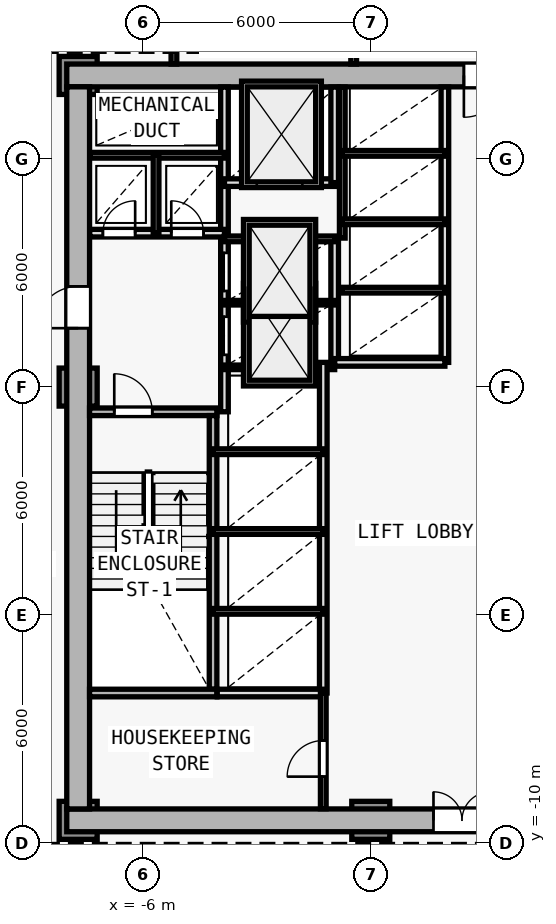
"""IFC4 building model, lengths in metres.
Left out: names, types, materials, properties, quantities, classifications, styles, units other than length and angle.
Written with IfcOpenShell. Run it as: python <this file> out.ifc"""

import sys

from ifc_helpers import new_model, si_unit, direction, frame, frame_2d, origin, origin_2d, place, context, subcontext, project, spatial, rectangle, extrude, element, fill, save


model = new_model("IFC4")
c1 = context("Model", 3, precision=1e-05, world=origin(), true_north=direction((0.0, 1.0)))
c2 = subcontext(c1, "Body", "Model", "MODEL_VIEW")
j1 = project(units=[si_unit("LENGTHUNIT", "METRE"), si_unit("PLANEANGLEUNIT", "RADIAN")], contexts=[c1])
p1 = place(None, origin())
s1 = spatial("IfcSite", under=j1, at=p1, CompositionType="ELEMENT")
p2 = place(p1, origin())
s2 = spatial("IfcBuilding", under=s1, at=p2, CompositionType="ELEMENT")
p3 = place(p2, frame((0.0, 0.0, 13.4)))
s3 = spatial("IfcBuildingStorey", under=s2, at=p3, CompositionType="ELEMENT", Elevation=13.4)
for number, where, z_axis, x_axis in (
    (1, (-7.7, -9.4, 0.0), (0.0, 0.0, 1.0), (1.0, 0.0, 0.0)),
    (2, (-7.7, 10.2, 0.0), (0.0, 0.0, 1.0), (1.0, 0.0, 0.0)),
    (3, (0.0, -9.4, 0.0), (0.0, 0.0, 1.0), (1.0, 0.0, 0.0)),
    (4, (-7.7, 2.0, 0.0), (0.0, 0.0, 1.0), (1.0, 0.0, 0.0)),
):
    element("IfcColumn", number, at=place(p3, frame(where, z_axis=z_axis, x_axis=x_axis)), inside=s3, PredefinedType="COLUMN", context=c2, shape_type="SweptSolid", body=[
        extrude(rectangle(XDim=1.0, YDim=1.0, at=origin_2d()), origin(), (0.0, 0.0, 1.0), 4.2),
    ])
p4 = place(p3, frame((-8.0, -9.4, 0.0), z_axis=(0.0, 0.0, 1.0), x_axis=(1.0, 0.0, 0.0)))
e5 = element("IfcWall", 5, at=p4, inside=s3, PredefinedType="SHEAR", context=c2, shape_type="SweptSolid", body=[
    extrude(rectangle(XDim=16.0, YDim=0.6, at=frame_2d((8.0, 0.0))), origin(), (0.0, 0.0, 1.0), 3.92),
])
p5 = place(p4, frame((9.65, 0.0, 0.0)))
e6 = element("IfcOpeningElement", 6, at=p5, cuts=e5, PredefinedType="OPENING", context=c2, shape_type="SweptSolid", body=[
    extrude(rectangle(XDim=1.5, YDim=2.2, at=frame_2d((0.75, 1.1))), frame((0.0, 0.31, 0.0), z_axis=(0.0, -1.0, 0.0), x_axis=(1.0, 0.0, 0.0)), (0.0, 0.0, 1.0), 0.62),
])
p6 = place(p3, frame((8.0, 10.2, 0.0), z_axis=(0.0, 0.0, 1.0), x_axis=(-1.0, 0.0, 0.0)))
e7 = element("IfcWall", 7, at=p6, inside=s3, PredefinedType="SHEAR", context=c2, shape_type="SweptSolid", body=[
    extrude(rectangle(XDim=16.0, YDim=0.6, at=frame_2d((8.0, 0.0))), origin(), (0.0, 0.0, 1.0), 3.92),
])
p7 = place(p6, frame((4.45, 0.0, 0.0)))
e8 = element("IfcOpeningElement", 8, at=p7, cuts=e7, PredefinedType="OPENING", context=c2, shape_type="SweptSolid", body=[
    extrude(rectangle(XDim=1.1, YDim=2.15, at=frame_2d((0.55, 1.075))), frame((0.0, 0.31, 0.0), z_axis=(0.0, -1.0, 0.0), x_axis=(1.0, 0.0, 0.0)), (0.0, 0.0, 1.0), 0.62),
])
p8 = place(p3, frame((-7.7, -9.1, 0.0), z_axis=(0.0, 0.0, 1.0), x_axis=(0.0, 1.0, 0.0)))
e9 = element("IfcWall", 9, at=p8, inside=s3, PredefinedType="SHEAR", context=c2, shape_type="SweptSolid", body=[
    extrude(rectangle(XDim=19.0, YDim=0.6, at=frame_2d((9.5, 0.0))), origin(), (0.0, 0.0, 1.0), 3.92),
])
p9 = place(p8, frame((12.65, 0.0, 0.0)))
e10 = element("IfcOpeningElement", 10, at=p9, cuts=e9, PredefinedType="OPENING", context=c2, shape_type="SweptSolid", body=[
    extrude(rectangle(XDim=1.1, YDim=2.15, at=frame_2d((0.55, 1.075))), frame((0.0, 0.31, 0.0), z_axis=(0.0, -1.0, 0.0), x_axis=(1.0, 0.0, 0.0)), (0.0, 0.0, 1.0), 0.62),
])
p10 = place(p3, frame((-7.4, 1.35, 0.0), z_axis=(0.0, 0.0, 1.0), x_axis=(1.0, 0.0, 0.0)))
e11 = element("IfcWall", 11, at=p10, inside=s3, PredefinedType="SOLIDWALL", context=c2, shape_type="SweptSolid", body=[
    extrude(rectangle(XDim=3.35, YDim=0.2, at=frame_2d((1.675, 0.0))), origin(), (0.0, 0.0, 1.0), 3.92),
])
p11 = place(p10, frame((0.65, 0.0, 0.0)))
e12 = element("IfcOpeningElement", 12, at=p11, cuts=e11, PredefinedType="OPENING", context=c2, shape_type="SweptSolid", body=[
    extrude(rectangle(XDim=1.0, YDim=2.15, at=frame_2d((0.5, 1.075))), frame((0.0, 0.11, 0.0), z_axis=(0.0, -1.0, 0.0), x_axis=(1.0, 0.0, 0.0)), (0.0, 0.0, 1.0), 0.22),
])
p12 = place(p3, frame((-4.15, -5.95, 0.0), z_axis=(0.0, 0.0, 1.0), x_axis=(0.0, 1.0, 0.0)))
e13 = element("IfcWall", 13, at=p12, inside=s3, PredefinedType="SOLIDWALL", context=c2, shape_type="SweptSolid", body=[
    extrude(rectangle(XDim=7.2, YDim=0.2, at=frame_2d((3.6, 0.0))), origin(), (0.0, 0.0, 1.0), 3.92),
])
p13 = place(p3, frame((-3.85, 1.35, 0.0), z_axis=(0.0, 0.0, 1.0), x_axis=(0.0, 1.0, 0.0)))
e14 = element("IfcWall", 14, at=p13, inside=s3, PredefinedType="SOLIDWALL", context=c2, shape_type="SweptSolid", body=[
    extrude(rectangle(XDim=8.545, YDim=0.2, at=frame_2d((4.272, 0.0))), origin(), (0.0, 0.0, 1.0), 3.92),
])
p14 = place(p13, frame((1.5, 0.0, 0.0)))
e15 = element("IfcOpeningElement", 15, at=p14, cuts=e14, PredefinedType="OPENING", context=c2, shape_type="SweptSolid", body=[
    extrude(rectangle(XDim=1.0, YDim=2.15, at=frame_2d((0.5, 1.075))), frame((0.0, 0.11, 0.0), z_axis=(0.0, -1.0, 0.0), x_axis=(1.0, 0.0, 0.0)), (0.0, 0.0, 1.0), 0.22),
])
p15 = place(p13, frame((3.18, 0.0, 0.0)))
e16 = element("IfcOpeningElement", 16, at=p15, cuts=e14, PredefinedType="OPENING", context=c2, shape_type="SweptSolid", body=[
    extrude(rectangle(XDim=1.0, YDim=2.15, at=frame_2d((0.5, 1.075))), frame((0.0, 0.11, 0.0), z_axis=(0.0, -1.0, 0.0), x_axis=(1.0, 0.0, 0.0)), (0.0, 0.0, 1.0), 0.22),
])
p16 = place(p3, frame((-7.395, 6.05, 0.0), z_axis=(0.0, 0.0, 1.0), x_axis=(1.0, 0.0, 0.0)))
e17 = element("IfcWall", 17, at=p16, inside=s3, PredefinedType="SOLIDWALL", context=c2, shape_type="SweptSolid", body=[
    extrude(rectangle(XDim=3.545, YDim=0.2, at=frame_2d((1.772, 0.0))), origin(), (0.0, 0.0, 1.0), 3.92),
])
p17 = place(p16, frame((0.345, 0.0, 0.0)))
e18 = element("IfcOpeningElement", 18, at=p17, cuts=e17, PredefinedType="OPENING", context=c2, shape_type="SweptSolid", body=[
    extrude(rectangle(XDim=0.85, YDim=2.1, at=frame_2d((0.425, 1.05))), frame((0.0, 0.11, 0.0), z_axis=(0.0, -1.0, 0.0), x_axis=(1.0, 0.0, 0.0)), (0.0, 0.0, 1.0), 0.22),
])
p18 = place(p16, frame((2.145, 0.0, 0.0)))
e19 = element("IfcOpeningElement", 19, at=p18, cuts=e17, PredefinedType="OPENING", context=c2, shape_type="SweptSolid", body=[
    extrude(rectangle(XDim=0.85, YDim=2.1, at=frame_2d((0.425, 1.05))), frame((0.0, 0.11, 0.0), z_axis=(0.0, -1.0, 0.0), x_axis=(1.0, 0.0, 0.0)), (0.0, 0.0, 1.0), 0.22),
])
p19 = place(p3, frame((-7.395, 8.1, 0.0), z_axis=(0.0, 0.0, 1.0), x_axis=(1.0, 0.0, 0.0)))
e20 = element("IfcWall", 20, at=p19, inside=s3, PredefinedType="PARTITIONING", context=c2, shape_type="SweptSolid", body=[
    extrude(rectangle(XDim=3.545, YDim=0.15, at=frame_2d((1.772, 0.0))), origin(), (0.0, 0.0, 1.0), 3.92),
])
p20 = place(p3, frame((-5.65, 6.05, 0.0), z_axis=(0.0, 0.0, 1.0), x_axis=(0.0, 1.0, 0.0)))
e21 = element("IfcWall", 21, at=p20, inside=s3, PredefinedType="PARTITIONING", context=c2, shape_type="SweptSolid", body=[
    extrude(rectangle(XDim=2.05, YDim=0.15, at=frame_2d((1.025, 0.0))), origin(), (0.0, 0.0, 1.0), 3.92),
])
p21 = place(p3, frame((-0.95, 2.65, 0.0), z_axis=(0.0, 0.0, 1.0), x_axis=(0.0, 1.0, 0.0)))
e22 = element("IfcWall", 22, at=p21, inside=s3, PredefinedType="SOLIDWALL", context=c2, shape_type="SweptSolid", body=[
    extrude(rectangle(XDim=3.27, YDim=0.2, at=frame_2d((1.635, 0.0))), origin(), (0.0, 0.0, 1.0), 3.92),
])
for number, where, z_axis, x_axis in (
    (23, (-3.85, 2.52, 0.0), (0.0, 0.0, 1.0), (1.0, 0.0, 0.0)),
    (24, (-3.85, 4.22, 0.0), (0.0, 0.0, 1.0), (1.0, 0.0, 0.0)),
):
    element("IfcWall", number, at=place(p3, frame(where, z_axis=z_axis, x_axis=x_axis)), inside=s3, PredefinedType="PARTITIONING", context=c2, shape_type="SweptSolid", body=[
        extrude(rectangle(XDim=2.9, YDim=0.12, at=frame_2d((1.45, 0.0))), origin(), (0.0, 0.0, 1.0), 3.92),
    ])
p22 = place(p3, frame((-3.85, 5.9, 0.0), z_axis=(0.0, 0.0, 1.0), x_axis=(1.0, 0.0, 0.0)))
e25 = element("IfcWall", 25, at=p22, inside=s3, PredefinedType="PARTITIONING", context=c2, shape_type="SweptSolid", body=[
    extrude(rectangle(XDim=2.9, YDim=0.15, at=frame_2d((1.45, 0.0))), origin(), (0.0, 0.0, 1.0), 3.92),
])
p23 = place(p3, frame((-3.85, 7.38, 0.0), z_axis=(0.0, 0.0, 1.0), x_axis=(1.0, 0.0, 0.0)))
e26 = element("IfcWall", 26, at=p23, inside=s3, PredefinedType="SOLIDWALL", context=c2, shape_type="SweptSolid", body=[
    extrude(rectangle(XDim=2.9, YDim=0.2, at=frame_2d((1.45, 0.0))), origin(), (0.0, 0.0, 1.0), 3.92),
])
p24 = place(p23, frame((0.85, 0.0, 0.0)))
e27 = element("IfcOpeningElement", 27, at=p24, cuts=e26, PredefinedType="OPENING", context=c2, shape_type="SweptSolid", body=[
    extrude(rectangle(XDim=1.2, YDim=2.2, at=frame_2d((0.6, 1.1))), frame((0.0, 0.11, 0.0), z_axis=(0.0, -1.0, 0.0), x_axis=(1.0, 0.0, 0.0)), (0.0, 0.0, 1.0), 0.22),
])
p25 = place(p3, frame((-0.95, 7.38, 0.0), z_axis=(0.0, 0.0, 1.0), x_axis=(0.0, 1.0, 0.0)))
e28 = element("IfcWall", 28, at=p25, inside=s3, PredefinedType="SOLIDWALL", context=c2, shape_type="SweptSolid", body=[
    extrude(rectangle(XDim=2.515, YDim=0.2, at=frame_2d((1.258, 0.0))), origin(), (0.0, 0.0, 1.0), 3.92),
])
p26 = place(p3, frame((-1.25, -6.05, 0.0), z_axis=(0.0, 0.0, 1.0), x_axis=(0.0, 1.0, 0.0)))
e29 = element("IfcWall", 29, at=p26, inside=s3, PredefinedType="SOLIDWALL", context=c2, shape_type="SweptSolid", body=[
    extrude(rectangle(XDim=8.7, YDim=0.2, at=frame_2d((4.35, 0.0))), origin(), (0.0, 0.0, 1.0), 3.92),
])
for number, where, z_axis, x_axis in (
    (30, (-4.15, -3.9, 0.0), (0.0, 0.0, 1.0), (1.0, 0.0, 0.0)),
    (31, (-4.15, -1.8, 0.0), (0.0, 0.0, 1.0), (1.0, 0.0, 0.0)),
    (32, (-4.15, 0.3, 0.0), (0.0, 0.0, 1.0), (1.0, 0.0, 0.0)),
):
    element("IfcWall", number, at=place(p3, frame(where, z_axis=z_axis, x_axis=x_axis)), inside=s3, PredefinedType="PARTITIONING", context=c2, shape_type="SweptSolid", body=[
        extrude(rectangle(XDim=2.9, YDim=0.15, at=frame_2d((1.45, 0.0))), origin(), (0.0, 0.0, 1.0), 3.92),
    ])
p27 = place(p3, frame((1.95, 2.65, 0.0), z_axis=(0.0, 0.0, 1.0), x_axis=(0.0, 1.0, 0.0)))
e33 = element("IfcWall", 33, at=p27, inside=s3, PredefinedType="SOLIDWALL", context=c2, shape_type="SweptSolid", body=[
    extrude(rectangle(XDim=7.245, YDim=0.2, at=frame_2d((3.623, 0.0))), origin(), (0.0, 0.0, 1.0), 3.92),
])
p28 = place(p3, frame((-0.95, 2.65, 0.0), z_axis=(0.0, 0.0, 1.0), x_axis=(1.0, 0.0, 0.0)))
e34 = element("IfcWall", 34, at=p28, inside=s3, PredefinedType="SOLIDWALL", context=c2, shape_type="SweptSolid", body=[
    extrude(rectangle(XDim=2.9, YDim=0.2, at=frame_2d((1.45, 0.0))), origin(), (0.0, 0.0, 1.0), 3.92),
])
p29 = place(p3, frame((-0.75, 5.92, 0.0), z_axis=(0.0, 0.0, 1.0), x_axis=(0.0, 1.0, 0.0)))
e35 = element("IfcWall", 35, at=p29, inside=s3, PredefinedType="PARTITIONING", context=c2, shape_type="SweptSolid", body=[
    extrude(rectangle(XDim=3.975, YDim=0.15, at=frame_2d((1.988, 0.0))), origin(), (0.0, 0.0, 1.0), 3.92),
])
for number, where, z_axis, x_axis in (
    (36, (-0.75, 4.55, 0.0), (0.0, 0.0, 1.0), (1.0, 0.0, 0.0)),
    (37, (-0.75, 6.35, 0.0), (0.0, 0.0, 1.0), (1.0, 0.0, 0.0)),
    (38, (-0.75, 8.15, 0.0), (0.0, 0.0, 1.0), (1.0, 0.0, 0.0)),
):
    element("IfcWall", number, at=place(p3, frame(where, z_axis=z_axis, x_axis=x_axis)), inside=s3, PredefinedType="PARTITIONING", context=c2, shape_type="SweptSolid", body=[
        extrude(rectangle(XDim=2.7, YDim=0.15, at=frame_2d((1.35, 0.0))), origin(), (0.0, 0.0, 1.0), 3.92),
    ])
p30 = place(p3, frame((-7.4, -6.05, 0.0), z_axis=(0.0, 0.0, 1.0), x_axis=(1.0, 0.0, 0.0)))
e39 = element("IfcWall", 39, at=p30, inside=s3, PredefinedType="SOLIDWALL", context=c2, shape_type="SweptSolid", body=[
    extrude(rectangle(XDim=3.35, YDim=0.2, at=frame_2d((1.675, 0.0))), origin(), (0.0, 0.0, 1.0), 3.92),
])
p31 = place(p3, frame((-4.04, -6.05, 0.0), z_axis=(0.0, 0.0, 1.0), x_axis=(1.0, 0.0, 0.0)))
e40 = element("IfcWall", 40, at=p31, inside=s3, PredefinedType="SOLIDWALL", context=c2, shape_type="SweptSolid", body=[
    extrude(rectangle(XDim=2.79, YDim=0.2, at=frame_2d((1.395, 0.0))), origin(), (0.0, 0.0, 1.0), 3.92),
])
p32 = place(p3, frame((-1.25, -9.095, 0.0), z_axis=(0.0, 0.0, 1.0), x_axis=(0.0, 1.0, 0.0)))
e41 = element("IfcWall", 41, at=p32, inside=s3, PredefinedType="PARTITIONING", context=c2, shape_type="SweptSolid", body=[
    extrude(rectangle(XDim=3.045, YDim=0.15, at=frame_2d((1.522, 0.0))), origin(), (0.0, 0.0, 1.0), 3.92),
])
p33 = place(p32, frame((0.845, 0.0, 0.0)))
e42 = element("IfcOpeningElement", 42, at=p33, cuts=e41, PredefinedType="OPENING", context=c2, shape_type="SweptSolid", body=[
    extrude(rectangle(XDim=0.95, YDim=2.1, at=frame_2d((0.475, 1.05))), frame((0.0, 0.085, 0.0), z_axis=(0.0, -1.0, 0.0), x_axis=(1.0, 0.0, 0.0)), (0.0, 0.0, 1.0), 0.17),
])
p34 = place(p3, frame((-5.18, 10.5, 0.0), z_axis=(0.0, 0.0, 1.0), x_axis=(0.0, 1.0, 0.0)))
e43 = element("IfcWall", 43, at=p34, inside=s3, PredefinedType="PARTITIONING", context=c2, shape_type="SweptSolid", body=[
    extrude(rectangle(XDim=7.78, YDim=0.15, at=frame_2d((3.89, 0.0))), origin(), (0.0, 0.0, 1.0), 3.92),
])
p35 = place(p34, frame((1.849, 0.0, 0.0)))
e44 = element("IfcOpeningElement", 44, at=p35, cuts=e43, PredefinedType="OPENING", context=c2, shape_type="SweptSolid", body=[
    extrude(rectangle(XDim=0.9, YDim=2.1, at=frame_2d((0.45, 1.05))), frame((0.0, 0.085, 0.0), z_axis=(0.0, -1.0, 0.0), x_axis=(1.0, 0.0, 0.0)), (0.0, 0.0, 1.0), 0.17),
])
p36 = place(p3, frame((-0.45, 10.5, 0.0), z_axis=(0.0, 0.0, 1.0), x_axis=(0.0, 1.0, 0.0)))
e45 = element("IfcWall", 45, at=p36, inside=s3, PredefinedType="PARTITIONING", context=c2, shape_type="SweptSolid", body=[
    extrude(rectangle(XDim=4.75, YDim=0.15, at=frame_2d((2.375, 0.0))), origin(), (0.0, 0.0, 1.0), 3.92),
])
p37 = place(p5, origin())
e46 = element("IfcDoor", 46, at=p37, inside=s3, OperationType="DOUBLE_DOOR_SINGLE_SWING", PredefinedType="DOOR", context=c2, shape_type="SweptSolid", body=[
    extrude(rectangle(XDim=1.5, YDim=2.2, at=frame_2d((0.75, 1.1))), frame((0.0, 0.025, 0.0), z_axis=(0.0, -1.0, 0.0), x_axis=(1.0, 0.0, 0.0)), (0.0, 0.0, 1.0), 0.05),
])
fill(e6, e46)
p38 = place(p9, origin())
e47 = element("IfcDoor", 47, at=p38, inside=s3, OperationType="SINGLE_SWING_LEFT", PredefinedType="DOOR", context=c2, shape_type="SweptSolid", body=[
    extrude(rectangle(XDim=1.1, YDim=2.15, at=frame_2d((0.55, 1.075))), frame((0.0, 0.025, 0.0), z_axis=(0.0, -1.0, 0.0), x_axis=(1.0, 0.0, 0.0)), (0.0, 0.0, 1.0), 0.05),
])
fill(e10, e47)
p39 = place(p7, origin())
e48 = element("IfcDoor", 48, at=p39, inside=s3, OperationType="SINGLE_SWING_RIGHT", PredefinedType="DOOR", context=c2, shape_type="SweptSolid", body=[
    extrude(rectangle(XDim=1.1, YDim=2.15, at=frame_2d((0.55, 1.075))), frame((0.0, 0.025, 0.0), z_axis=(0.0, -1.0, 0.0), x_axis=(1.0, 0.0, 0.0)), (0.0, 0.0, 1.0), 0.05),
])
fill(e8, e48)
p40 = place(p11, origin())
e49 = element("IfcDoor", 49, at=p40, inside=s3, OperationType="SINGLE_SWING_LEFT", PredefinedType="DOOR", context=c2, shape_type="SweptSolid", body=[
    extrude(rectangle(XDim=1.0, YDim=2.15, at=frame_2d((0.5, 1.075))), frame((0.0, 0.025, 0.0), z_axis=(0.0, -1.0, 0.0), x_axis=(1.0, 0.0, 0.0)), (0.0, 0.0, 1.0), 0.05),
])
fill(e12, e49)
p41 = place(p17, origin())
e50 = element("IfcDoor", 50, at=p41, inside=s3, OperationType="SINGLE_SWING_RIGHT", PredefinedType="DOOR", context=c2, shape_type="SweptSolid", body=[
    extrude(rectangle(XDim=0.85, YDim=2.1, at=frame_2d((0.425, 1.05))), frame((0.0, 0.025, 0.0), z_axis=(0.0, -1.0, 0.0), x_axis=(1.0, 0.0, 0.0)), (0.0, 0.0, 1.0), 0.05),
])
fill(e18, e50)
p42 = place(p18, origin())
e51 = element("IfcDoor", 51, at=p42, inside=s3, OperationType="SINGLE_SWING_LEFT", PredefinedType="DOOR", context=c2, shape_type="SweptSolid", body=[
    extrude(rectangle(XDim=0.85, YDim=2.1, at=frame_2d((0.425, 1.05))), frame((0.0, 0.025, 0.0), z_axis=(0.0, -1.0, 0.0), x_axis=(1.0, 0.0, 0.0)), (0.0, 0.0, 1.0), 0.05),
])
fill(e19, e51)
p43 = place(p24, origin())
e52 = element("IfcDoor", 52, at=p43, inside=s3, OperationType="DOUBLE_DOOR_SLIDING", PredefinedType="DOOR", context=c2, shape_type="SweptSolid", body=[
    extrude(rectangle(XDim=1.2, YDim=2.2, at=frame_2d((0.6, 1.1))), frame((0.0, 0.025, 0.0), z_axis=(0.0, -1.0, 0.0), x_axis=(1.0, 0.0, 0.0)), (0.0, 0.0, 1.0), 0.05),
])
fill(e27, e52)
p44 = place(p14, origin())
e53 = element("IfcDoor", 53, at=p44, inside=s3, OperationType="DOUBLE_DOOR_SLIDING", PredefinedType="DOOR", context=c2, shape_type="SweptSolid", body=[
    extrude(rectangle(XDim=1.0, YDim=2.15, at=frame_2d((0.5, 1.075))), frame((0.0, 0.025, 0.0), z_axis=(0.0, -1.0, 0.0), x_axis=(1.0, 0.0, 0.0)), (0.0, 0.0, 1.0), 0.05),
])
fill(e15, e53)
p45 = place(p15, origin())
e54 = element("IfcDoor", 54, at=p45, inside=s3, OperationType="DOUBLE_DOOR_SLIDING", PredefinedType="DOOR", context=c2, shape_type="SweptSolid", body=[
    extrude(rectangle(XDim=1.0, YDim=2.15, at=frame_2d((0.5, 1.075))), frame((0.0, 0.025, 0.0), z_axis=(0.0, -1.0, 0.0), x_axis=(1.0, 0.0, 0.0)), (0.0, 0.0, 1.0), 0.05),
])
fill(e16, e54)
p46 = place(p33, origin())
e55 = element("IfcDoor", 55, at=p46, inside=s3, OperationType="SINGLE_SWING_LEFT", PredefinedType="DOOR", context=c2, shape_type="SweptSolid", body=[
    extrude(rectangle(XDim=0.95, YDim=2.1, at=frame_2d((0.475, 1.05))), frame((0.0, 0.025, 0.0), z_axis=(0.0, -1.0, 0.0), x_axis=(1.0, 0.0, 0.0)), (0.0, 0.0, 1.0), 0.05),
])
fill(e42, e55)
save(model, sys.argv[1])
